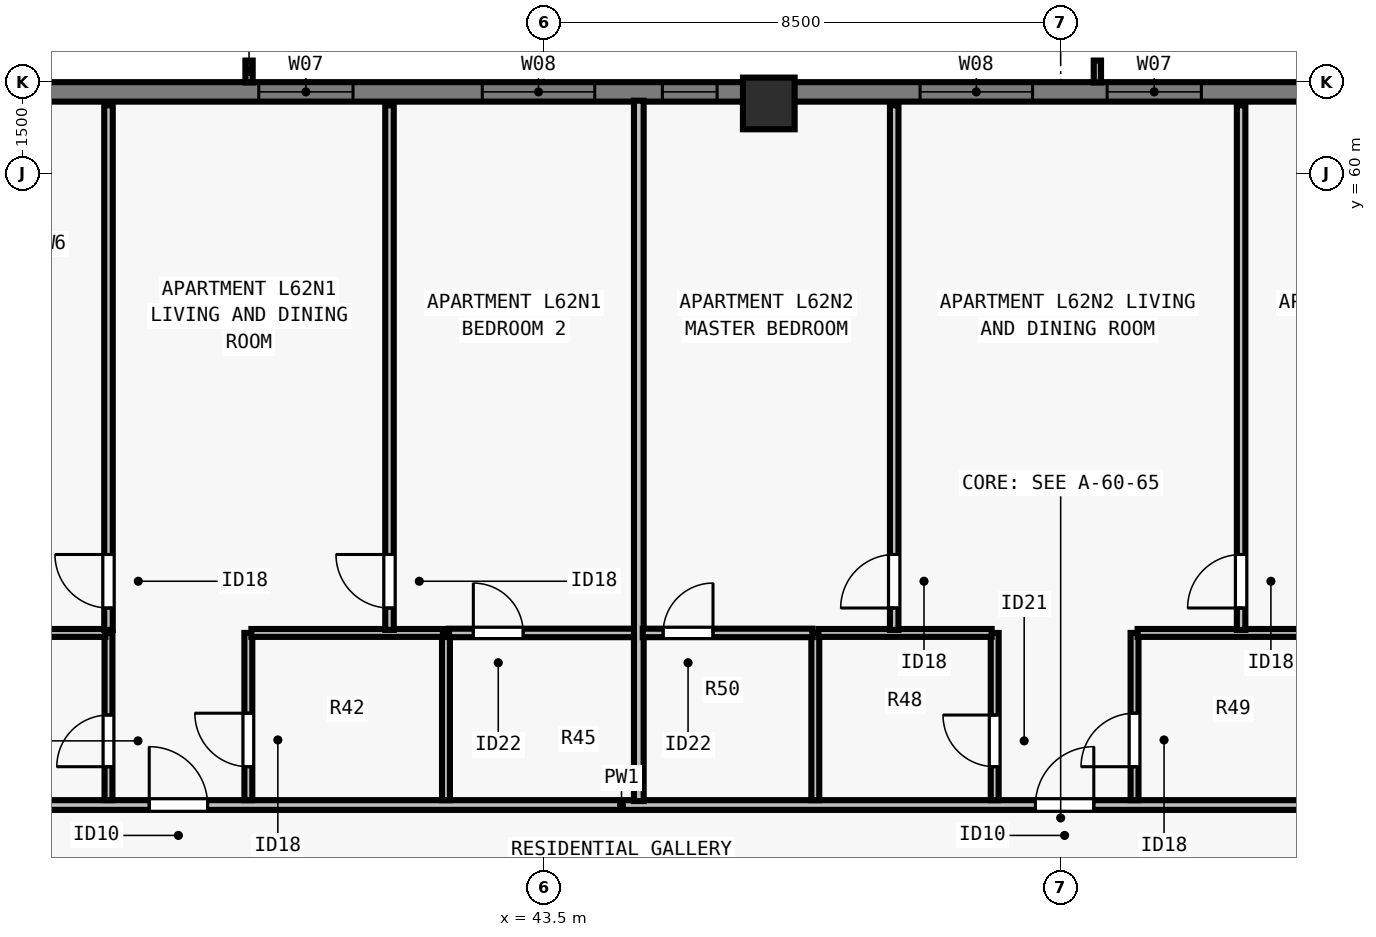
"""IFC4 building model, lengths in metres.
Left out: names, types, materials, properties, quantities, classifications, styles, units other than length and angle.
Written with IfcOpenShell. Run it as: python <this file> out.ifc"""

import sys

from ifc_helpers import new_model, si_unit, direction, frame, frame_2d, origin, origin_2d, place, context, subcontext, project, spatial, rectangle, extrude, element, fill, save


model = new_model("IFC4")
c1 = context("Model", 3, precision=1e-05, world=origin(), true_north=direction((0.0, 1.0)))
c2 = subcontext(c1, "Body", "Model", "MODEL_VIEW")
j1 = project(units=[si_unit("LENGTHUNIT", "METRE"), si_unit("PLANEANGLEUNIT", "RADIAN")], contexts=[c1])
p1 = place(None, origin())
s1 = spatial("IfcSite", under=j1, at=p1, CompositionType="ELEMENT")
p2 = place(p1, origin())
s2 = spatial("IfcBuilding", under=s1, at=p2, CompositionType="ELEMENT")
p3 = place(p2, frame((0.0, 0.0, 227.0)))
s3 = spatial("IfcBuildingStorey", under=s2, at=p3, CompositionType="ELEMENT", Elevation=227.0)
p4 = place(p3, frame((47.2, 61.15, 0.0), z_axis=(0.0, 0.0, 1.0), x_axis=(1.0, 0.0, 0.0)))
e1 = element("IfcColumn", 1, at=p4, inside=s3, PredefinedType="COLUMN", context=c2, shape_type="SweptSolid", body=[
    extrude(rectangle(XDim=0.85, YDim=0.85, at=origin_2d()), origin(), (0.0, 0.0, 1.0), 3.5),
])
p5 = place(p3, frame((34.5, 61.34, 0.0), z_axis=(0.0, 0.0, 1.0), x_axis=(1.0, 0.0, 0.0)))
e2 = element("IfcWall", 2, at=p5, inside=s3, PredefinedType="SOLIDWALL", context=c2, shape_type="SweptSolid", body=[
    extrude(rectangle(XDim=34.702, YDim=0.32, at=frame_2d((17.351, 0.0))), origin(), (0.0, 0.0, 1.0), 3.29),
])
p6 = place(p5, frame((4.312, 0.0, 0.8)))
e3 = element("IfcOpeningElement", 3, at=p6, cuts=e2, PredefinedType="OPENING", context=c2, shape_type="SweptSolid", body=[
    extrude(rectangle(XDim=1.55, YDim=1.678, at=frame_2d((0.775, 0.839))), frame((0.0, 0.17, 0.0), z_axis=(0.0, -1.0, 0.0), x_axis=(1.0, 0.0, 0.0)), (0.0, 0.0, 1.0), 0.34),
])
p7 = place(p5, frame((7.988, 0.0, 0.8)))
e4 = element("IfcOpeningElement", 4, at=p7, cuts=e2, PredefinedType="OPENING", context=c2, shape_type="SweptSolid", body=[
    extrude(rectangle(XDim=1.85, YDim=1.678, at=frame_2d((0.925, 0.839))), frame((0.0, 0.17, 0.0), z_axis=(0.0, -1.0, 0.0), x_axis=(1.0, 0.0, 0.0)), (0.0, 0.0, 1.0), 0.34),
])
p8 = place(p5, frame((15.188, 0.0, 0.8)))
e5 = element("IfcOpeningElement", 5, at=p8, cuts=e2, PredefinedType="OPENING", context=c2, shape_type="SweptSolid", body=[
    extrude(rectangle(XDim=1.85, YDim=1.678, at=frame_2d((0.925, 0.839))), frame((0.0, 0.17, 0.0), z_axis=(0.0, -1.0, 0.0), x_axis=(1.0, 0.0, 0.0)), (0.0, 0.0, 1.0), 0.34),
])
p9 = place(p5, frame((18.264, 0.0, 0.8)))
e6 = element("IfcOpeningElement", 6, at=p9, cuts=e2, PredefinedType="OPENING", context=c2, shape_type="SweptSolid", body=[
    extrude(rectangle(XDim=1.55, YDim=1.678, at=frame_2d((0.775, 0.839))), frame((0.0, 0.17, 0.0), z_axis=(0.0, -1.0, 0.0), x_axis=(1.0, 0.0, 0.0)), (0.0, 0.0, 1.0), 0.34),
])
p10 = place(p5, frame((25.014, 0.0, 0.8)))
e7 = element("IfcOpeningElement", 7, at=p10, cuts=e2, PredefinedType="OPENING", context=c2, shape_type="SweptSolid", body=[
    extrude(rectangle(XDim=1.55, YDim=1.678, at=frame_2d((0.775, 0.839))), frame((0.0, 0.17, 0.0), z_axis=(0.0, -1.0, 0.0), x_axis=(1.0, 0.0, 0.0)), (0.0, 0.0, 1.0), 0.34),
])
p11 = place(p5, frame((10.95, 0.0, 0.8)))
e8 = element("IfcOpeningElement", 8, at=p11, cuts=e2, PredefinedType="OPENING", context=c2, shape_type="SweptSolid", body=[
    extrude(rectangle(XDim=0.9, YDim=1.678, at=frame_2d((0.45, 0.839))), frame((0.0, 0.17, 0.0), z_axis=(0.0, -1.0, 0.0), x_axis=(1.0, 0.0, 0.0)), (0.0, 0.0, 1.0), 0.34),
])
p12 = place(p5, frame((22.87, 0.0, 0.8)))
e9 = element("IfcOpeningElement", 9, at=p12, cuts=e2, PredefinedType="OPENING", context=c2, shape_type="SweptSolid", body=[
    extrude(rectangle(XDim=0.9, YDim=1.678, at=frame_2d((0.45, 0.839))), frame((0.0, 0.17, 0.0), z_axis=(0.0, -1.0, 0.0), x_axis=(1.0, 0.0, 0.0)), (0.0, 0.0, 1.0), 0.34),
])
p13 = place(p3, frame((29.77, 49.613, 0.0), z_axis=(0.0, 0.0, 1.0), x_axis=(1.0, 0.0, 0.0)))
e10 = element("IfcWall", 10, at=p13, inside=s3, PredefinedType="PARTITIONING", context=c2, shape_type="SweptSolid", body=[
    extrude(rectangle(XDim=44.425, YDim=0.16, at=frame_2d((22.212, 0.0))), origin(), (0.0, 0.0, 1.0), 2.958),
])
p14 = place(p13, frame((7.241, 0.0, 0.0)))
e11 = element("IfcOpeningElement", 11, at=p14, cuts=e10, PredefinedType="OPENING", context=c2, shape_type="SweptSolid", body=[
    extrude(rectangle(XDim=0.96, YDim=2.18, at=frame_2d((0.48, 1.09))), frame((0.0, 0.09, 0.0), z_axis=(0.0, -1.0, 0.0), x_axis=(1.0, 0.0, 0.0)), (0.0, 0.0, 1.0), 0.18),
])
p15 = place(p13, frame((21.815, 0.0, 0.0)))
e12 = element("IfcOpeningElement", 12, at=p15, cuts=e10, PredefinedType="OPENING", context=c2, shape_type="SweptSolid", body=[
    extrude(rectangle(XDim=0.96, YDim=2.18, at=frame_2d((0.48, 1.09))), frame((0.0, 0.09, 0.0), z_axis=(0.0, -1.0, 0.0), x_axis=(1.0, 0.0, 0.0)), (0.0, 0.0, 1.0), 0.18),
])
p16 = place(p13, frame((36.324, 0.0, 0.0)))
e13 = element("IfcOpeningElement", 13, at=p16, cuts=e10, PredefinedType="OPENING", context=c2, shape_type="SweptSolid", body=[
    extrude(rectangle(XDim=0.96, YDim=2.18, at=frame_2d((0.48, 1.09))), frame((0.0, 0.09, 0.0), z_axis=(0.0, -1.0, 0.0), x_axis=(1.0, 0.0, 0.0)), (0.0, 0.0, 1.0), 0.18),
])
p17 = place(p3, frame((36.341, 49.692, 0.0), z_axis=(0.0, 0.0, 1.0), x_axis=(0.0, 1.0, 0.0)))
e14 = element("IfcWall", 14, at=p17, inside=s3, PredefinedType="PLUMBINGWALL", context=c2, shape_type="SweptSolid", body=[
    extrude(rectangle(XDim=2.75, YDim=0.13, at=frame_2d((1.375, 0.0))), origin(), (0.0, 0.0, 1.0), 3.29),
])
p18 = place(p17, frame((0.55, 0.0, 0.0)))
e15 = element("IfcOpeningElement", 15, at=p18, cuts=e14, PredefinedType="OPENING", context=c2, shape_type="SweptSolid", body=[
    extrude(rectangle(XDim=0.85, YDim=2.08, at=frame_2d((0.425, 1.04))), frame((0.0, 0.075, 0.0), z_axis=(0.0, -1.0, 0.0), x_axis=(1.0, 0.0, 0.0)), (0.0, 0.0, 1.0), 0.15),
])
p19 = place(p3, frame((33.441, 52.442, 0.0), z_axis=(0.0, 0.0, 1.0), x_axis=(1.0, 0.0, 0.0)))
e16 = element("IfcWall", 16, at=p19, inside=s3, PredefinedType="PLUMBINGWALL", context=c2, shape_type="SweptSolid", body=[
    extrude(rectangle(XDim=2.85, YDim=0.13, at=frame_2d((1.425, 0.0))), origin(), (0.0, 0.0, 1.0), 2.958),
])
p20 = place(p3, frame((41.891, 49.692, 0.0), z_axis=(0.0, 0.0, 1.0), x_axis=(0.0, 1.0, 0.0)))
e17 = element("IfcWall", 17, at=p20, inside=s3, PredefinedType="PLUMBINGWALL", context=c2, shape_type="SweptSolid", body=[
    extrude(rectangle(XDim=2.75, YDim=0.13, at=frame_2d((1.375, 0.0))), origin(), (0.0, 0.0, 1.0), 2.573),
])
p21 = place(p3, frame((38.641, 49.692, 0.0), z_axis=(0.0, 0.0, 1.0), x_axis=(0.0, 1.0, 0.0)))
e18 = element("IfcWall", 18, at=p21, inside=s3, PredefinedType="PLUMBINGWALL", context=c2, shape_type="SweptSolid", body=[
    extrude(rectangle(XDim=2.75, YDim=0.13, at=frame_2d((1.375, 0.0))), origin(), (0.0, 0.0, 1.0), 3.29),
])
p22 = place(p21, frame((0.55, 0.0, 0.0)))
e19 = element("IfcOpeningElement", 19, at=p22, cuts=e18, PredefinedType="OPENING", context=c2, shape_type="SweptSolid", body=[
    extrude(rectangle(XDim=0.88, YDim=2.1, at=frame_2d((0.44, 1.05))), frame((0.0, 0.075, 0.0), z_axis=(0.0, -1.0, 0.0), x_axis=(1.0, 0.0, 0.0)), (0.0, 0.0, 1.0), 0.15),
])
p23 = place(p3, frame((38.691, 52.442, 0.0), z_axis=(0.0, 0.0, 1.0), x_axis=(1.0, 0.0, 0.0)))
e20 = element("IfcWall", 20, at=p23, inside=s3, PredefinedType="PLUMBINGWALL", context=c2, shape_type="SweptSolid", body=[
    extrude(rectangle(XDim=3.15, YDim=0.13, at=frame_2d((1.575, 0.0))), origin(), (0.0, 0.0, 1.0), 3.29),
])
p24 = place(p3, frame((36.341, 52.492, 0.0), z_axis=(0.0, 0.0, 1.0), x_axis=(0.0, 1.0, 0.0)))
e21 = element("IfcWall", 21, at=p24, inside=s3, PredefinedType="PARTITIONING", context=c2, shape_type="SweptSolid", body=[
    extrude(rectangle(XDim=8.628, YDim=0.14, at=frame_2d((4.314, 0.0))), origin(), (0.0, 0.0, 1.0), 2.573),
])
p25 = place(p24, frame((0.36, 0.0, 0.0)))
e22 = element("IfcOpeningElement", 22, at=p25, cuts=e21, PredefinedType="OPENING", context=c2, shape_type="SweptSolid", body=[
    extrude(rectangle(XDim=0.88, YDim=2.1, at=frame_2d((0.44, 1.05))), frame((0.0, 0.08, 0.0), z_axis=(0.0, -1.0, 0.0), x_axis=(1.0, 0.0, 0.0)), (0.0, 0.0, 1.0), 0.16),
])
p26 = place(p3, frame((40.962, 52.492, 0.0), z_axis=(0.0, 0.0, 1.0), x_axis=(0.0, 1.0, 0.0)))
e23 = element("IfcWall", 23, at=p26, inside=s3, PredefinedType="PARTITIONING", context=c2, shape_type="SweptSolid", body=[
    extrude(rectangle(XDim=8.628, YDim=0.14, at=frame_2d((4.314, 0.0))), origin(), (0.0, 0.0, 1.0), 3.29),
])
p27 = place(p26, frame((0.36, 0.0, 0.0)))
e24 = element("IfcOpeningElement", 24, at=p27, cuts=e23, PredefinedType="OPENING", context=c2, shape_type="SweptSolid", body=[
    extrude(rectangle(XDim=0.88, YDim=2.1, at=frame_2d((0.44, 1.05))), frame((0.0, 0.08, 0.0), z_axis=(0.0, -1.0, 0.0), x_axis=(1.0, 0.0, 0.0)), (0.0, 0.0, 1.0), 0.16),
])
p28 = place(p3, frame((41.941, 52.442, 0.0), z_axis=(0.0, 0.0, 1.0), x_axis=(1.0, 0.0, 0.0)))
e25 = element("IfcWall", 25, at=p28, inside=s3, PredefinedType="PARTITIONING", context=c2, shape_type="SweptSolid", body=[
    extrude(rectangle(XDim=3.171, YDim=0.14, at=frame_2d((1.586, 0.0))), origin(), (0.0, 0.0, 1.0), 3.29),
])
p29 = place(p28, frame((0.4, 0.0, 0.0)))
e26 = element("IfcOpeningElement", 26, at=p29, cuts=e25, PredefinedType="OPENING", context=c2, shape_type="SweptSolid", body=[
    extrude(rectangle(XDim=0.82, YDim=2.1, at=frame_2d((0.41, 1.05))), frame((0.0, 0.08, 0.0), z_axis=(0.0, -1.0, 0.0), x_axis=(1.0, 0.0, 0.0)), (0.0, 0.0, 1.0), 0.16),
])
p30 = place(p3, frame((45.062, 49.677, 0.0), z_axis=(0.0, 0.0, 1.0), x_axis=(0.0, 1.0, 0.0)))
e27 = element("IfcWall", 27, at=p30, inside=s3, PredefinedType="PARTITIONING", context=c2, shape_type="SweptSolid", body=[
    extrude(rectangle(XDim=11.518, YDim=0.16, at=frame_2d((5.759, 0.0))), origin(), (0.0, 0.0, 1.0), 3.29),
])
p31 = place(p3, frame((47.965, 49.692, 0.0), z_axis=(0.0, 0.0, 1.0), x_axis=(0.0, 1.0, 0.0)))
e28 = element("IfcWall", 28, at=p31, inside=s3, PredefinedType="PLUMBINGWALL", context=c2, shape_type="SweptSolid", body=[
    extrude(rectangle(XDim=2.75, YDim=0.13, at=frame_2d((1.375, 0.0))), origin(), (0.0, 0.0, 1.0), 3.29),
])
p32 = place(p3, frame((50.915, 49.692, 0.0), z_axis=(0.0, 0.0, 1.0), x_axis=(0.0, 1.0, 0.0)))
e29 = element("IfcWall", 29, at=p32, inside=s3, PredefinedType="PLUMBINGWALL", context=c2, shape_type="SweptSolid", body=[
    extrude(rectangle(XDim=2.75, YDim=0.13, at=frame_2d((1.375, 0.0))), origin(), (0.0, 0.0, 1.0), 3.29),
])
p33 = place(p32, frame((0.55, 0.0, 0.0)))
e30 = element("IfcOpeningElement", 30, at=p33, cuts=e29, PredefinedType="OPENING", context=c2, shape_type="SweptSolid", body=[
    extrude(rectangle(XDim=0.85, YDim=2.08, at=frame_2d((0.425, 1.04))), frame((0.0, 0.075, 0.0), z_axis=(0.0, -1.0, 0.0), x_axis=(1.0, 0.0, 0.0)), (0.0, 0.0, 1.0), 0.15),
])
p34 = place(p3, frame((48.015, 52.442, 0.0), z_axis=(0.0, 0.0, 1.0), x_axis=(1.0, 0.0, 0.0)))
e31 = element("IfcWall", 31, at=p34, inside=s3, PredefinedType="PLUMBINGWALL", context=c2, shape_type="SweptSolid", body=[
    extrude(rectangle(XDim=2.85, YDim=0.13, at=frame_2d((1.425, 0.0))), origin(), (0.0, 0.0, 1.0), 3.29),
])
p35 = place(p3, frame((53.215, 49.692, 0.0), z_axis=(0.0, 0.0, 1.0), x_axis=(0.0, 1.0, 0.0)))
e32 = element("IfcWall", 32, at=p35, inside=s3, PredefinedType="PLUMBINGWALL", context=c2, shape_type="SweptSolid", body=[
    extrude(rectangle(XDim=2.75, YDim=0.13, at=frame_2d((1.375, 0.0))), origin(), (0.0, 0.0, 1.0), 3.29),
])
p36 = place(p35, frame((0.55, 0.0, 0.0)))
e33 = element("IfcOpeningElement", 33, at=p36, cuts=e32, PredefinedType="OPENING", context=c2, shape_type="SweptSolid", body=[
    extrude(rectangle(XDim=0.88, YDim=2.1, at=frame_2d((0.44, 1.05))), frame((0.0, 0.075, 0.0), z_axis=(0.0, -1.0, 0.0), x_axis=(1.0, 0.0, 0.0)), (0.0, 0.0, 1.0), 0.15),
])
p37 = place(p3, frame((53.265, 52.442, 0.0), z_axis=(0.0, 0.0, 1.0), x_axis=(1.0, 0.0, 0.0)))
e34 = element("IfcWall", 34, at=p37, inside=s3, PredefinedType="PLUMBINGWALL", context=c2, shape_type="SweptSolid", body=[
    extrude(rectangle(XDim=3.15, YDim=0.13, at=frame_2d((1.575, 0.0))), origin(), (0.0, 0.0, 1.0), 3.29),
])
p38 = place(p3, frame((49.262, 52.492, 0.0), z_axis=(0.0, 0.0, 1.0), x_axis=(0.0, 1.0, 0.0)))
e35 = element("IfcWall", 35, at=p38, inside=s3, PredefinedType="PARTITIONING", context=c2, shape_type="SweptSolid", body=[
    extrude(rectangle(XDim=8.628, YDim=0.14, at=frame_2d((4.314, 0.0))), origin(), (0.0, 0.0, 1.0), 3.29),
])
p39 = place(p38, frame((0.36, 0.0, 0.0)))
e36 = element("IfcOpeningElement", 36, at=p39, cuts=e35, PredefinedType="OPENING", context=c2, shape_type="SweptSolid", body=[
    extrude(rectangle(XDim=0.88, YDim=2.1, at=frame_2d((0.44, 1.05))), frame((0.0, 0.08, 0.0), z_axis=(0.0, -1.0, 0.0), x_axis=(1.0, 0.0, 0.0)), (0.0, 0.0, 1.0), 0.16),
])
p40 = place(p3, frame((45.127, 52.442, 0.0), z_axis=(0.0, 0.0, 1.0), x_axis=(1.0, 0.0, 0.0)))
e37 = element("IfcWall", 37, at=p40, inside=s3, PredefinedType="PARTITIONING", context=c2, shape_type="SweptSolid", body=[
    extrude(rectangle(XDim=2.788, YDim=0.14, at=frame_2d((1.394, 0.0))), origin(), (0.0, 0.0, 1.0), 3.29),
])
p41 = place(p40, frame((0.335, 0.0, 0.0)))
e38 = element("IfcOpeningElement", 38, at=p41, cuts=e37, PredefinedType="OPENING", context=c2, shape_type="SweptSolid", body=[
    extrude(rectangle(XDim=0.82, YDim=2.1, at=frame_2d((0.41, 1.05))), frame((0.0, 0.08, 0.0), z_axis=(0.0, -1.0, 0.0), x_axis=(1.0, 0.0, 0.0)), (0.0, 0.0, 1.0), 0.16),
])
p42 = place(p3, frame((54.968, 52.492, 0.0), z_axis=(0.0, 0.0, 1.0), x_axis=(0.0, 1.0, 0.0)))
e39 = element("IfcWall", 39, at=p42, inside=s3, PredefinedType="PARTITIONING", context=c2, shape_type="SweptSolid", body=[
    extrude(rectangle(XDim=8.628, YDim=0.14, at=frame_2d((4.314, 0.0))), origin(), (0.0, 0.0, 1.0), 2.958),
])
p43 = place(p42, frame((0.36, 0.0, 0.0)))
e40 = element("IfcOpeningElement", 40, at=p43, cuts=e39, PredefinedType="OPENING", context=c2, shape_type="SweptSolid", body=[
    extrude(rectangle(XDim=0.88, YDim=2.1, at=frame_2d((0.44, 1.05))), frame((0.0, 0.08, 0.0), z_axis=(0.0, -1.0, 0.0), x_axis=(1.0, 0.0, 0.0)), (0.0, 0.0, 1.0), 0.16),
])
p44 = place(p6, origin())
e41 = element("IfcWindow", 41, at=p44, inside=s3, PartitioningType="SINGLE_PANEL", PredefinedType="WINDOW", context=c2, shape_type="SweptSolid", body=[
    extrude(rectangle(XDim=1.55, YDim=1.678, at=frame_2d((0.775, 0.839))), frame((0.0, -0.05, 0.0), z_axis=(0.0, -1.0, 0.0), x_axis=(1.0, 0.0, 0.0)), (0.0, 0.0, 1.0), 0.06),
])
fill(e3, e41)
p45 = place(p7, origin())
e42 = element("IfcWindow", 42, at=p45, inside=s3, PartitioningType="SINGLE_PANEL", PredefinedType="WINDOW", context=c2, shape_type="SweptSolid", body=[
    extrude(rectangle(XDim=1.85, YDim=1.678, at=frame_2d((0.925, 0.839))), frame((0.0, -0.05, 0.0), z_axis=(0.0, -1.0, 0.0), x_axis=(1.0, 0.0, 0.0)), (0.0, 0.0, 1.0), 0.06),
])
fill(e4, e42)
p46 = place(p8, origin())
e43 = element("IfcWindow", 43, at=p46, inside=s3, PartitioningType="SINGLE_PANEL", PredefinedType="WINDOW", context=c2, shape_type="SweptSolid", body=[
    extrude(rectangle(XDim=1.85, YDim=1.678, at=frame_2d((0.925, 0.839))), frame((0.0, -0.05, 0.0), z_axis=(0.0, -1.0, 0.0), x_axis=(1.0, 0.0, 0.0)), (0.0, 0.0, 1.0), 0.06),
])
fill(e5, e43)
p47 = place(p9, origin())
e44 = element("IfcWindow", 44, at=p47, inside=s3, PartitioningType="SINGLE_PANEL", PredefinedType="WINDOW", context=c2, shape_type="SweptSolid", body=[
    extrude(rectangle(XDim=1.55, YDim=1.678, at=frame_2d((0.775, 0.839))), frame((0.0, -0.05, 0.0), z_axis=(0.0, -1.0, 0.0), x_axis=(1.0, 0.0, 0.0)), (0.0, 0.0, 1.0), 0.06),
])
fill(e6, e44)
p48 = place(p11, origin())
e45 = element("IfcWindow", 45, at=p48, inside=s3, PartitioningType="SINGLE_PANEL", PredefinedType="WINDOW", context=c2, shape_type="SweptSolid", body=[
    extrude(rectangle(XDim=0.9, YDim=1.678, at=frame_2d((0.45, 0.839))), frame((0.0, -0.04, 0.0), z_axis=(0.0, -1.0, 0.0), x_axis=(1.0, 0.0, 0.0)), (0.0, 0.0, 1.0), 0.06),
])
fill(e8, e45)
p49 = place(p18, origin())
e46 = element("IfcDoor", 46, at=p49, inside=s3, OperationType="SINGLE_SWING_LEFT", PredefinedType="DOOR", context=c2, shape_type="SweptSolid", body=[
    extrude(rectangle(XDim=0.85, YDim=2.08, at=frame_2d((0.425, 1.04))), frame((0.0, 0.025, 0.0), z_axis=(0.0, -1.0, 0.0), x_axis=(1.0, 0.0, 0.0)), (0.0, 0.0, 1.0), 0.05),
])
fill(e15, e46)
p50 = place(p22, origin())
e47 = element("IfcDoor", 47, at=p50, inside=s3, OperationType="SINGLE_SWING_RIGHT", PredefinedType="DOOR", context=c2, shape_type="SweptSolid", body=[
    extrude(rectangle(XDim=0.88, YDim=2.1, at=frame_2d((0.44, 1.05))), frame((0.0, 0.025, 0.0), z_axis=(0.0, -1.0, 0.0), x_axis=(1.0, 0.0, 0.0)), (0.0, 0.0, 1.0), 0.05),
])
fill(e19, e47)
p51 = place(p25, origin())
e48 = element("IfcDoor", 48, at=p51, inside=s3, OperationType="SINGLE_SWING_RIGHT", PredefinedType="DOOR", context=c2, shape_type="SweptSolid", body=[
    extrude(rectangle(XDim=0.88, YDim=2.1, at=frame_2d((0.44, 1.05))), frame((0.0, 0.025, 0.0), z_axis=(0.0, -1.0, 0.0), x_axis=(1.0, 0.0, 0.0)), (0.0, 0.0, 1.0), 0.05),
])
fill(e22, e48)
p52 = place(p29, origin())
e49 = element("IfcDoor", 49, at=p52, inside=s3, OperationType="SINGLE_SWING_LEFT", PredefinedType="DOOR", context=c2, shape_type="SweptSolid", body=[
    extrude(rectangle(XDim=0.82, YDim=2.1, at=frame_2d((0.41, 1.05))), frame((0.0, 0.025, 0.0), z_axis=(0.0, -1.0, 0.0), x_axis=(1.0, 0.0, 0.0)), (0.0, 0.0, 1.0), 0.05),
])
fill(e26, e49)
p53 = place(p27, origin())
e50 = element("IfcDoor", 50, at=p53, inside=s3, OperationType="SINGLE_SWING_RIGHT", PredefinedType="DOOR", context=c2, shape_type="SweptSolid", body=[
    extrude(rectangle(XDim=0.88, YDim=2.1, at=frame_2d((0.44, 1.05))), frame((0.0, 0.025, 0.0), z_axis=(0.0, -1.0, 0.0), x_axis=(1.0, 0.0, 0.0)), (0.0, 0.0, 1.0), 0.05),
])
fill(e24, e50)
p54 = place(p14, origin())
e51 = element("IfcDoor", 51, at=p54, inside=s3, OperationType="SINGLE_SWING_LEFT", PredefinedType="DOOR", context=c2, shape_type="SweptSolid", body=[
    extrude(rectangle(XDim=0.96, YDim=2.18, at=frame_2d((0.48, 1.09))), frame((0.0, 0.025, 0.0), z_axis=(0.0, -1.0, 0.0), x_axis=(1.0, 0.0, 0.0)), (0.0, 0.0, 1.0), 0.05),
])
fill(e11, e51)
p55 = place(p33, origin())
e52 = element("IfcDoor", 52, at=p55, inside=s3, OperationType="SINGLE_SWING_RIGHT", PredefinedType="DOOR", context=c2, shape_type="SweptSolid", body=[
    extrude(rectangle(XDim=0.85, YDim=2.08, at=frame_2d((0.425, 1.04))), frame((0.0, 0.025, 0.0), z_axis=(0.0, -1.0, 0.0), x_axis=(1.0, 0.0, 0.0)), (0.0, 0.0, 1.0), 0.05),
])
fill(e30, e52)
p56 = place(p36, origin())
e53 = element("IfcDoor", 53, at=p56, inside=s3, OperationType="SINGLE_SWING_LEFT", PredefinedType="DOOR", context=c2, shape_type="SweptSolid", body=[
    extrude(rectangle(XDim=0.88, YDim=2.1, at=frame_2d((0.44, 1.05))), frame((0.0, 0.025, 0.0), z_axis=(0.0, -1.0, 0.0), x_axis=(1.0, 0.0, 0.0)), (0.0, 0.0, 1.0), 0.05),
])
fill(e33, e53)
p57 = place(p41, origin())
e54 = element("IfcDoor", 54, at=p57, inside=s3, OperationType="SINGLE_SWING_RIGHT", PredefinedType="DOOR", context=c2, shape_type="SweptSolid", body=[
    extrude(rectangle(XDim=0.82, YDim=2.1, at=frame_2d((0.41, 1.05))), frame((0.0, 0.025, 0.0), z_axis=(0.0, -1.0, 0.0), x_axis=(1.0, 0.0, 0.0)), (0.0, 0.0, 1.0), 0.05),
])
fill(e38, e54)
p58 = place(p39, origin())
e55 = element("IfcDoor", 55, at=p58, inside=s3, OperationType="SINGLE_SWING_LEFT", PredefinedType="DOOR", context=c2, shape_type="SweptSolid", body=[
    extrude(rectangle(XDim=0.88, YDim=2.1, at=frame_2d((0.44, 1.05))), frame((0.0, 0.025, 0.0), z_axis=(0.0, -1.0, 0.0), x_axis=(1.0, 0.0, 0.0)), (0.0, 0.0, 1.0), 0.05),
])
fill(e36, e55)
p59 = place(p43, origin())
e56 = element("IfcDoor", 56, at=p59, inside=s3, OperationType="SINGLE_SWING_LEFT", PredefinedType="DOOR", context=c2, shape_type="SweptSolid", body=[
    extrude(rectangle(XDim=0.88, YDim=2.1, at=frame_2d((0.44, 1.05))), frame((0.0, 0.025, 0.0), z_axis=(0.0, -1.0, 0.0), x_axis=(1.0, 0.0, 0.0)), (0.0, 0.0, 1.0), 0.05),
])
fill(e40, e56)
p60 = place(p15, origin())
e57 = element("IfcDoor", 57, at=p60, inside=s3, OperationType="SINGLE_SWING_RIGHT", PredefinedType="DOOR", context=c2, shape_type="SweptSolid", body=[
    extrude(rectangle(XDim=0.96, YDim=2.18, at=frame_2d((0.48, 1.09))), frame((0.0, 0.025, 0.0), z_axis=(0.0, -1.0, 0.0), x_axis=(1.0, 0.0, 0.0)), (0.0, 0.0, 1.0), 0.05),
])
fill(e12, e57)
save(model, sys.argv[1])
